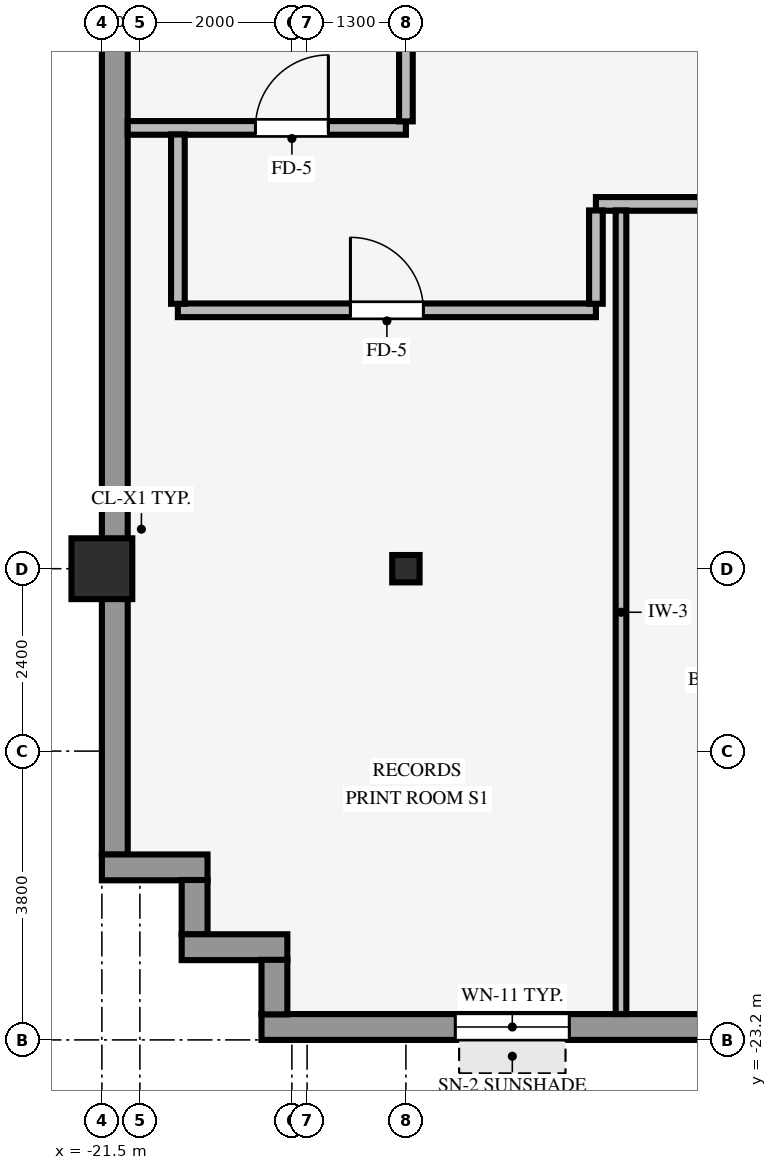
"""IFC4 building model, lengths in metres.
Left out: names, types, materials, properties, quantities, classifications, styles, units other than length and angle.
Written with IfcOpenShell. Run it as: python <this file> out.ifc"""

import sys

from ifc_helpers import new_model, si_unit, direction, frame, frame_2d, origin, origin_2d, place, context, subcontext, project, spatial, rectangle, hollow_rectangle, i_section, extrude, source, transform, mapped, element, fill, save


model = new_model("IFC4")
c1 = context("Model", 3, precision=1e-05, world=origin(), true_north=direction((0.0, 1.0)))
c2 = subcontext(c1, "Body", "Model", "MODEL_VIEW")
j1 = project(units=[si_unit("LENGTHUNIT", "METRE"), si_unit("PLANEANGLEUNIT", "RADIAN")], contexts=[c1])
p1 = place(None, origin())
s1 = spatial("IfcSite", under=j1, at=p1, CompositionType="ELEMENT")
p2 = place(p1, origin())
s2 = spatial("IfcBuilding", under=s1, at=p2, CompositionType="ELEMENT")
p3 = place(p2, frame((0.0, 0.0, 67.75)))
s3 = spatial("IfcBuildingStorey", under=s2, at=p3, CompositionType="ELEMENT", Elevation=67.75)
p4 = place(p3, frame((-21.5, -17.0, 0.0), z_axis=(0.0, 0.0, 1.0), x_axis=(1.0, 0.0, 0.0)))
e1 = element("IfcColumn", 1, at=p4, inside=s3, PredefinedType="COLUMN", context=c2, shape_type="SweptSolid", body=[
    extrude(hollow_rectangle(XDim=0.8, YDim=0.8, WallThickness=0.055, InnerFilletRadius=0.055, OuterFilletRadius=0.11, at=origin_2d()), origin(), (0.0, 0.0, 1.0), 3.37),
])
p5 = place(p3, frame((-17.5, -17.0, 0.0), z_axis=(0.0, 0.0, 1.0), x_axis=(1.0, 0.0, 0.0)))
e2 = element("IfcColumn", 2, at=p5, inside=s3, PredefinedType="COLUMN", context=c2, shape_type="SweptSolid", body=[
    extrude(i_section(OverallWidth=0.36, OverallDepth=0.36, WebThickness=0.021, FlangeThickness=0.021, FilletRadius=0.018, at=origin_2d()), origin(), (0.0, 0.0, 1.0), 3.37),
])
p6 = place(p3, frame((-19.4, -23.03, 0.0), z_axis=(0.0, 0.0, 1.0), x_axis=(1.0, 0.0, 0.0)))
e3 = element("IfcWall", 3, at=p6, inside=s3, PredefinedType="STANDARD", context=c2, shape_type="SweptSolid", body=[
    extrude(rectangle(XDim=38.8, YDim=0.34, at=frame_2d((19.4, 0.0))), origin(), (0.0, 0.0, 1.0), 2.705),
])
p7 = place(p6, frame((2.55, 0.0, 0.8)))
e4 = element("IfcOpeningElement", 4, at=p7, cuts=e3, PredefinedType="OPENING", context=c2, shape_type="SweptSolid", body=[
    extrude(rectangle(XDim=1.5, YDim=1.6, at=frame_2d((0.75, 0.8))), frame((0.0, 0.18, 0.0), z_axis=(0.0, -1.0, 0.0), x_axis=(1.0, 0.0, 0.0)), (0.0, 0.0, 1.0), 0.36),
])
p8 = place(p6, frame((6.25, 0.0, 0.8)))
e5 = element("IfcOpeningElement", 5, at=p8, cuts=e3, PredefinedType="OPENING", context=c2, shape_type="SweptSolid", body=[
    extrude(rectangle(XDim=1.5, YDim=1.6, at=frame_2d((0.75, 0.8))), frame((0.0, 0.18, 0.0), z_axis=(0.0, -1.0, 0.0), x_axis=(1.0, 0.0, 0.0)), (0.0, 0.0, 1.0), 0.36),
])
p9 = place(p6, frame((12.65, 0.0, 0.8)))
e6 = element("IfcOpeningElement", 6, at=p9, cuts=e3, PredefinedType="OPENING", context=c2, shape_type="SweptSolid", body=[
    extrude(rectangle(XDim=1.5, YDim=1.6, at=frame_2d((0.75, 0.8))), frame((0.0, 0.18, 0.0), z_axis=(0.0, -1.0, 0.0), x_axis=(1.0, 0.0, 0.0)), (0.0, 0.0, 1.0), 0.36),
])
p10 = place(p6, frame((16.35, 0.0, 0.8)))
e7 = element("IfcOpeningElement", 7, at=p10, cuts=e3, PredefinedType="OPENING", context=c2, shape_type="SweptSolid", body=[
    extrude(rectangle(XDim=1.5, YDim=1.6, at=frame_2d((0.75, 0.8))), frame((0.0, 0.18, 0.0), z_axis=(0.0, -1.0, 0.0), x_axis=(1.0, 0.0, 0.0)), (0.0, 0.0, 1.0), 0.36),
])
p11 = place(p6, frame((20.95, 0.0, 0.8)))
e8 = element("IfcOpeningElement", 8, at=p11, cuts=e3, PredefinedType="OPENING", context=c2, shape_type="SweptSolid", body=[
    extrude(rectangle(XDim=1.5, YDim=1.6, at=frame_2d((0.75, 0.8))), frame((0.0, 0.18, 0.0), z_axis=(0.0, -1.0, 0.0), x_axis=(1.0, 0.0, 0.0)), (0.0, 0.0, 1.0), 0.36),
])
p12 = place(p6, frame((25.55, 0.0, 0.8)))
e9 = element("IfcOpeningElement", 9, at=p12, cuts=e3, PredefinedType="OPENING", context=c2, shape_type="SweptSolid", body=[
    extrude(rectangle(XDim=1.5, YDim=1.6, at=frame_2d((0.75, 0.8))), frame((0.0, 0.18, 0.0), z_axis=(0.0, -1.0, 0.0), x_axis=(1.0, 0.0, 0.0)), (0.0, 0.0, 1.0), 0.36),
])
p13 = place(p6, frame((30.15, 0.0, 0.8)))
e10 = element("IfcOpeningElement", 10, at=p13, cuts=e3, PredefinedType="OPENING", context=c2, shape_type="SweptSolid", body=[
    extrude(rectangle(XDim=1.5, YDim=1.6, at=frame_2d((0.75, 0.8))), frame((0.0, 0.18, 0.0), z_axis=(0.0, -1.0, 0.0), x_axis=(1.0, 0.0, 0.0)), (0.0, 0.0, 1.0), 0.36),
])
p14 = place(p6, frame((34.75, 0.0, 0.8)))
e11 = element("IfcOpeningElement", 11, at=p14, cuts=e3, PredefinedType="OPENING", context=c2, shape_type="SweptSolid", body=[
    extrude(rectangle(XDim=1.5, YDim=1.6, at=frame_2d((0.75, 0.8))), frame((0.0, 0.18, 0.0), z_axis=(0.0, -1.0, 0.0), x_axis=(1.0, 0.0, 0.0)), (0.0, 0.0, 1.0), 0.36),
])
p15 = place(p3, frame((-21.33, -20.764, 0.0), z_axis=(0.0, 0.0, 1.0), x_axis=(0.0, 1.0, 0.0)))
e12 = element("IfcWall", 12, at=p15, inside=s3, PredefinedType="STANDARD", context=c2, shape_type="SweptSolid", body=[
    extrude(rectangle(XDim=41.528, YDim=0.34, at=frame_2d((20.764, 0.0))), origin(), (0.0, 0.0, 1.0), 2.705),
])
p16 = place(p15, frame((15.364, 0.0, 0.0)))
e13 = element("IfcOpeningElement", 13, at=p16, cuts=e12, PredefinedType="OPENING", context=c2, shape_type="SweptSolid", body=[
    extrude(rectangle(XDim=1.05, YDim=2.1, at=frame_2d((0.525, 1.05))), frame((0.0, 0.18, 0.0), z_axis=(0.0, -1.0, 0.0), x_axis=(1.0, 0.0, 0.0)), (0.0, 0.0, 1.0), 0.36),
])
p17 = place(p15, frame((12.202, 0.0, 0.8)))
e14 = element("IfcOpeningElement", 14, at=p17, cuts=e12, PredefinedType="OPENING", context=c2, shape_type="SweptSolid", body=[
    extrude(rectangle(XDim=2.3, YDim=1.62, at=frame_2d((1.15, 0.81))), frame((0.0, 0.18, 0.0), z_axis=(0.0, -1.0, 0.0), x_axis=(1.0, 0.0, 0.0)), (0.0, 0.0, 1.0), 0.36),
])
p18 = place(p15, frame((17.144, 0.0, 0.8)))
e15 = element("IfcOpeningElement", 15, at=p18, cuts=e12, PredefinedType="OPENING", context=c2, shape_type="SweptSolid", body=[
    extrude(rectangle(XDim=2.3, YDim=1.62, at=frame_2d((1.15, 0.81))), frame((0.0, 0.18, 0.0), z_axis=(0.0, -1.0, 0.0), x_axis=(1.0, 0.0, 0.0)), (0.0, 0.0, 1.0), 0.36),
])
p19 = place(p15, frame((27.025, 0.0, 0.8)))
e16 = element("IfcOpeningElement", 16, at=p19, cuts=e12, PredefinedType="OPENING", context=c2, shape_type="SweptSolid", body=[
    extrude(rectangle(XDim=2.3, YDim=1.62, at=frame_2d((1.15, 0.81))), frame((0.0, 0.18, 0.0), z_axis=(0.0, -1.0, 0.0), x_axis=(1.0, 0.0, 0.0)), (0.0, 0.0, 1.0), 0.36),
])
p20 = place(p3, frame((-21.5, -20.93, 0.0), z_axis=(0.0, 0.0, 1.0), x_axis=(1.0, 0.0, 0.0)))
e17 = element("IfcWall", 17, at=p20, inside=s3, PredefinedType="STANDARD", context=c2, shape_type="SweptSolid", body=[
    extrude(rectangle(XDim=1.39, YDim=0.34, at=frame_2d((0.695, 0.0))), origin(), (0.0, 0.0, 1.0), 3.36),
])
p21 = place(p3, frame((-20.28, -21.814, 0.0), z_axis=(0.0, 0.0, 1.0), x_axis=(0.0, 1.0, 0.0)))
e18 = element("IfcWall", 18, at=p21, inside=s3, PredefinedType="STANDARD", context=c2, shape_type="SweptSolid", body=[
    extrude(rectangle(XDim=0.718, YDim=0.34, at=frame_2d((0.359, 0.0))), origin(), (0.0, 0.0, 1.0), 3.36),
])
p22 = place(p3, frame((-20.45, -21.98, 0.0), z_axis=(0.0, 0.0, 1.0), x_axis=(1.0, 0.0, 0.0)))
e19 = element("IfcWall", 19, at=p22, inside=s3, PredefinedType="STANDARD", context=c2, shape_type="SweptSolid", body=[
    extrude(rectangle(XDim=1.39, YDim=0.34, at=frame_2d((0.695, 0.0))), origin(), (0.0, 0.0, 1.0), 3.36),
])
p23 = place(p3, frame((-19.23, -22.864, 0.0), z_axis=(0.0, 0.0, 1.0), x_axis=(0.0, 1.0, 0.0)))
e20 = element("IfcWall", 20, at=p23, inside=s3, PredefinedType="STANDARD", context=c2, shape_type="SweptSolid", body=[
    extrude(rectangle(XDim=0.718, YDim=0.34, at=frame_2d((0.359, 0.0))), origin(), (0.0, 0.0, 1.0), 3.36),
])
p24 = place(p3, frame((-20.5, -13.6, 0.0), z_axis=(0.0, 0.0, 1.0), x_axis=(1.0, 0.0, 0.0)))
e21 = element("IfcWall", 21, at=p24, inside=s3, PredefinedType="PARTITIONING", context=c2, shape_type="SweptSolid", body=[
    extrude(rectangle(XDim=5.5, YDim=0.18, at=frame_2d((2.75, 0.0))), origin(), (0.0, 0.0, 1.0), 2.942),
])
p25 = place(p24, frame((2.27, 0.0, 0.0)))
e22 = element("IfcOpeningElement", 22, at=p25, cuts=e21, PredefinedType="OPENING", context=c2, shape_type="SweptSolid", body=[
    extrude(rectangle(XDim=0.96, YDim=2.1, at=frame_2d((0.48, 1.05))), frame((0.0, 0.1, 0.0), z_axis=(0.0, -1.0, 0.0), x_axis=(1.0, 0.0, 0.0)), (0.0, 0.0, 1.0), 0.2),
])
p26 = place(p3, frame((-15.0, -12.2, 0.0), z_axis=(0.0, 0.0, 1.0), x_axis=(1.0, 0.0, 0.0)))
e23 = element("IfcWall", 23, at=p26, inside=s3, PredefinedType="PARTITIONING", context=c2, shape_type="SweptSolid", body=[
    extrude(rectangle(XDim=23.8, YDim=0.18, at=frame_2d((11.9, 0.0))), origin(), (0.0, 0.0, 1.0), 3.36),
])
p27 = place(p26, frame((9.31, 0.0, 0.0)))
e24 = element("IfcOpeningElement", 24, at=p27, cuts=e23, PredefinedType="OPENING", context=c2, shape_type="SweptSolid", body=[
    extrude(rectangle(XDim=0.96, YDim=2.1, at=frame_2d((0.48, 1.05))), frame((0.0, 0.1, 0.0), z_axis=(0.0, -1.0, 0.0), x_axis=(1.0, 0.0, 0.0)), (0.0, 0.0, 1.0), 0.2),
])
p28 = place(p26, frame((1.715, 0.0, 0.0)))
e25 = element("IfcOpeningElement", 25, at=p28, cuts=e23, PredefinedType="OPENING", context=c2, shape_type="SweptSolid", body=[
    extrude(rectangle(XDim=0.96, YDim=2.1, at=frame_2d((0.48, 1.05))), frame((0.0, 0.1, 0.0), z_axis=(0.0, -1.0, 0.0), x_axis=(1.0, 0.0, 0.0)), (0.0, 0.0, 1.0), 0.2),
])
p29 = place(p26, frame((5.44, 0.0, 0.0)))
e26 = element("IfcOpeningElement", 26, at=p29, cuts=e23, PredefinedType="OPENING", context=c2, shape_type="SweptSolid", body=[
    extrude(rectangle(XDim=0.96, YDim=2.1, at=frame_2d((0.48, 1.05))), frame((0.0, 0.1, 0.0), z_axis=(0.0, -1.0, 0.0), x_axis=(1.0, 0.0, 0.0)), (0.0, 0.0, 1.0), 0.2),
])
p30 = place(p26, frame((19.65, 0.0, 0.0)))
e27 = element("IfcOpeningElement", 27, at=p30, cuts=e23, PredefinedType="OPENING", context=c2, shape_type="SweptSolid", body=[
    extrude(rectangle(XDim=0.9, YDim=2.1, at=frame_2d((0.45, 1.05))), frame((0.0, 0.1, 0.0), z_axis=(0.0, -1.0, 0.0), x_axis=(1.0, 0.0, 0.0)), (0.0, 0.0, 1.0), 0.2),
])
p31 = place(p26, frame((17.05, 0.0, 0.0)))
e28 = element("IfcOpeningElement", 28, at=p31, cuts=e23, PredefinedType="OPENING", context=c2, shape_type="SweptSolid", body=[
    extrude(rectangle(XDim=0.9, YDim=2.1, at=frame_2d((0.45, 1.05))), frame((0.0, 0.1, 0.0), z_axis=(0.0, -1.0, 0.0), x_axis=(1.0, 0.0, 0.0)), (0.0, 0.0, 1.0), 0.2),
])
p32 = place(p26, frame((22.15, 0.0, 0.0)))
e29 = element("IfcOpeningElement", 29, at=p32, cuts=e23, PredefinedType="OPENING", context=c2, shape_type="SweptSolid", body=[
    extrude(rectangle(XDim=0.9, YDim=2.1, at=frame_2d((0.45, 1.05))), frame((0.0, 0.1, 0.0), z_axis=(0.0, -1.0, 0.0), x_axis=(1.0, 0.0, 0.0)), (0.0, 0.0, 1.0), 0.2),
])
p33 = place(p26, frame((14.72, 0.0, 0.0)))
e30 = element("IfcOpeningElement", 30, at=p33, cuts=e23, PredefinedType="OPENING", context=c2, shape_type="SweptSolid", body=[
    extrude(rectangle(XDim=0.96, YDim=2.1, at=frame_2d((0.48, 1.05))), frame((0.0, 0.1, 0.0), z_axis=(0.0, -1.0, 0.0), x_axis=(1.0, 0.0, 0.0)), (0.0, 0.0, 1.0), 0.2),
])
p34 = place(p3, frame((-21.16, -11.2, 0.0), z_axis=(0.0, 0.0, 1.0), x_axis=(1.0, 0.0, 0.0)))
e31 = element("IfcWall", 31, at=p34, inside=s3, PredefinedType="PARTITIONING", context=c2, shape_type="SweptSolid", body=[
    extrude(rectangle(XDim=3.66, YDim=0.18, at=frame_2d((1.83, 0.0))), origin(), (0.0, 0.0, 1.0), 3.36),
])
p35 = place(p34, frame((1.68, 0.0, 0.0)))
e32 = element("IfcOpeningElement", 32, at=p35, cuts=e31, PredefinedType="OPENING", context=c2, shape_type="SweptSolid", body=[
    extrude(rectangle(XDim=0.96, YDim=2.1, at=frame_2d((0.48, 1.05))), frame((0.0, 0.1, 0.0), z_axis=(0.0, -1.0, 0.0), x_axis=(1.0, 0.0, 0.0)), (0.0, 0.0, 1.0), 0.2),
])
p36 = place(p3, frame((-20.5, -13.514, 0.0), z_axis=(0.0, 0.0, 1.0), x_axis=(0.0, 1.0, 0.0)))
e33 = element("IfcWall", 33, at=p36, inside=s3, PredefinedType="PARTITIONING", context=c2, shape_type="SweptSolid", body=[
    extrude(rectangle(XDim=2.228, YDim=0.18, at=frame_2d((1.114, 0.0))), origin(), (0.0, 0.0, 1.0), 3.36),
])
p37 = place(p3, frame((-17.5, -11.114, 0.0), z_axis=(0.0, 0.0, 1.0), x_axis=(0.0, 1.0, 0.0)))
e34 = element("IfcWall", 34, at=p37, inside=s3, PredefinedType="PARTITIONING", context=c2, shape_type="SweptSolid", body=[
    extrude(rectangle(XDim=0.968, YDim=0.18, at=frame_2d((0.484, 0.0))), origin(), (0.0, 0.0, 1.0), 2.738),
])
p38 = place(p3, frame((-15.0, -13.514, 0.0), z_axis=(0.0, 0.0, 1.0), x_axis=(0.0, 1.0, 0.0)))
e35 = element("IfcWall", 35, at=p38, inside=s3, PredefinedType="PARTITIONING", context=c2, shape_type="SweptSolid", body=[
    extrude(rectangle(XDim=1.228, YDim=0.18, at=frame_2d((0.614, 0.0))), origin(), (0.0, 0.0, 1.0), 3.36),
])
p39 = place(p3, frame((-14.67, -22.86, 0.0), z_axis=(0.0, 0.0, 1.0), x_axis=(0.0, 1.0, 0.0)))
e36 = element("IfcWall", 36, at=p39, inside=s3, PredefinedType="PARTITIONING", context=c2, shape_type="SweptSolid", body=[
    extrude(rectangle(XDim=10.574, YDim=0.14, at=frame_2d((5.287, 0.0))), origin(), (0.0, 0.0, 1.0), 3.36),
])
m1 = source(origin(), c2, "Body", "SweptSolid", [
    extrude(rectangle(XDim=1.5, YDim=1.6, at=frame_2d((0.75, 0.8))), frame((0.0, 0.03, 0.0), z_axis=(0.0, -1.0, 0.0), x_axis=(1.0, 0.0, 0.0)), (0.0, 0.0, 1.0), 0.06),
])
p40 = place(p7, origin())
e37 = element("IfcWindow", 37, at=p40, inside=s3, PartitioningType="SINGLE_PANEL", PredefinedType="WINDOW", context=c2, shape_type="MappedRepresentation", body=[
    mapped(m1, transform((0.0, 0.0, 0.0), scale=1.0)),
])
fill(e4, e37)
m2 = source(origin(), c2, "Body", "SweptSolid", [
    extrude(rectangle(XDim=0.96, YDim=2.1, at=frame_2d((0.48, 1.05))), frame((0.0, 0.025, 0.0), z_axis=(0.0, -1.0, 0.0), x_axis=(1.0, 0.0, 0.0)), (0.0, 0.0, 1.0), 0.05),
])
p41 = place(p25, origin())
e38 = element("IfcDoor", 38, at=p41, inside=s3, OperationType="SINGLE_SWING_LEFT", PredefinedType="DOOR", context=c2, shape_type="MappedRepresentation", body=[
    mapped(m2, transform((0.0, 0.0, 0.0), scale=1.0)),
])
fill(e22, e38)
p42 = place(p35, origin())
e39 = element("IfcDoor", 39, at=p42, inside=s3, OperationType="SINGLE_SWING_RIGHT", PredefinedType="DOOR", context=c2, shape_type="MappedRepresentation", body=[
    mapped(m2, transform((0.0, 0.0, 0.0), scale=1.0)),
])
fill(e32, e39)
save(model, sys.argv[1])
